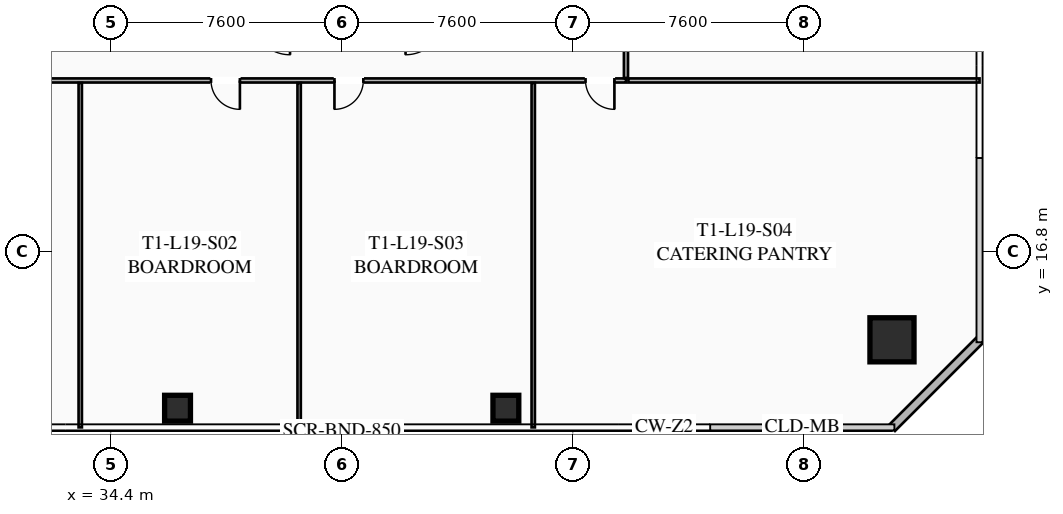
"""IFC4 building model, lengths in metres.
Left out: names, types, materials, properties, quantities, classifications, styles, units other than length and angle.
Written with IfcOpenShell. Run it as: python <this file> out.ifc"""

import sys

from ifc_helpers import new_model, si_unit, direction, frame, frame_2d, origin, origin_2d, place, context, subcontext, project, spatial, rectangle, hollow_rectangle, extrude, element, fill, save


model = new_model("IFC4")
c1 = context("Model", 3, precision=1e-05, world=origin(), true_north=direction((0.0, 1.0)))
c2 = subcontext(c1, "Body", "Model", "MODEL_VIEW")
j1 = project(units=[si_unit("LENGTHUNIT", "METRE"), si_unit("PLANEANGLEUNIT", "RADIAN")], contexts=[c1])
p1 = place(None, origin())
s1 = spatial("IfcSite", under=j1, at=p1, CompositionType="ELEMENT")
p2 = place(p1, origin())
s2 = spatial("IfcBuilding", under=s1, at=p2, CompositionType="ELEMENT")
p3 = place(p2, frame((0.0, 0.0, 74.3)))
s3 = spatial("IfcBuildingStorey", under=s2, at=p3, CompositionType="ELEMENT", Elevation=74.3)
p4 = place(p3, frame((60.1, 13.9, 0.0), z_axis=(0.0, 0.0, 1.0), x_axis=(1.0, 0.0, 0.0)))
e1 = element("IfcColumn", 1, at=p4, inside=s3, PredefinedType="COLUMN", context=c2, shape_type="SweptSolid", body=[
    extrude(hollow_rectangle(XDim=1.45, YDim=1.45, WallThickness=0.055, at=origin_2d()), origin(), (0.0, 0.0, 1.0), 3.35),
])
for number, where, z_axis, x_axis in (
    (2, (36.6, 11.65, 0.0), (0.0, 0.0, 1.0), (1.0, 0.0, 0.0)),
    (3, (47.4, 11.65, 0.0), (0.0, 0.0, 1.0), (1.0, 0.0, 0.0)),
):
    element("IfcColumn", number, at=place(p3, frame(where, z_axis=z_axis, x_axis=x_axis)), inside=s3, PredefinedType="COLUMN", context=c2, shape_type="SweptSolid", body=[
        extrude(hollow_rectangle(XDim=0.85, YDim=0.85, WallThickness=0.035, at=origin_2d()), origin(), (0.0, 0.0, 1.0), 3.35),
    ])
p5 = place(p3, frame((63.0, 13.9, 0.0), z_axis=(0.0, 0.0, 1.0), x_axis=(-0.707106781187, -0.707106781187, 0.0)))
e4 = element("IfcWall", 4, at=p5, inside=s3, PredefinedType="SOLIDWALL", context=c2, shape_type="SweptSolid", body=[
    extrude(rectangle(XDim=4.101, YDim=0.28, at=frame_2d((2.051, 0.0))), origin(), (0.0, 0.0, 1.0), 3.35),
])
p6 = place(p3, frame((51.35, 22.43, 0.0), z_axis=(0.0, 0.0, 1.0), x_axis=(-1.0, 0.0, 0.0)))
e5 = element("IfcWall", 5, at=p6, inside=s3, PredefinedType="PARTITIONING", context=c2, shape_type="SweptSolid", body=[
    extrude(rectangle(XDim=27.3, YDim=0.135, at=frame_2d((13.65, 0.0))), origin(), (0.0, 0.0, 1.0), 2.703),
])
p7 = place(p6, frame((25.97, 0.0, 0.0)))
e6 = element("IfcOpeningElement", 6, at=p7, cuts=e5, PredefinedType="OPENING", context=c2, shape_type="SweptSolid", body=[
    extrude(rectangle(XDim=0.95, YDim=2.05, at=frame_2d((0.475, 1.025))), frame((0.0, 0.077, 0.0), z_axis=(0.0, -1.0, 0.0), x_axis=(1.0, 0.0, 0.0)), (0.0, 0.0, 1.0), 0.155),
])
p8 = place(p6, frame((12.698, 0.0, 0.0)))
e7 = element("IfcOpeningElement", 7, at=p8, cuts=e5, PredefinedType="OPENING", context=c2, shape_type="SweptSolid", body=[
    extrude(rectangle(XDim=0.95, YDim=2.05, at=frame_2d((0.475, 1.025))), frame((0.0, 0.077, 0.0), z_axis=(0.0, -1.0, 0.0), x_axis=(1.0, 0.0, 0.0)), (0.0, 0.0, 1.0), 0.155),
])
p9 = place(p6, frame((8.639, 0.0, 0.0)))
e8 = element("IfcOpeningElement", 8, at=p9, cuts=e5, PredefinedType="OPENING", context=c2, shape_type="SweptSolid", body=[
    extrude(rectangle(XDim=0.95, YDim=2.05, at=frame_2d((0.475, 1.025))), frame((0.0, 0.077, 0.0), z_axis=(0.0, -1.0, 0.0), x_axis=(1.0, 0.0, 0.0)), (0.0, 0.0, 1.0), 0.155),
])
p10 = place(p6, frame((0.38, 0.0, 0.0)))
e9 = element("IfcOpeningElement", 9, at=p10, cuts=e5, PredefinedType="OPENING", context=c2, shape_type="SweptSolid", body=[
    extrude(rectangle(XDim=0.95, YDim=2.05, at=frame_2d((0.475, 1.025))), frame((0.0, 0.077, 0.0), z_axis=(0.0, -1.0, 0.0), x_axis=(1.0, 0.0, 0.0)), (0.0, 0.0, 1.0), 0.155),
])
for number, where, z_axis, x_axis in (
    (10, (33.4, 11.02, 0.0), (0.0, 0.0, 1.0), (0.0, 1.0, 0.0)),
    (11, (40.6, 11.02, 0.0), (0.0, 0.0, 1.0), (0.0, 1.0, 0.0)),
    (12, (48.3, 11.02, 0.0), (0.0, 0.0, 1.0), (0.0, 1.0, 0.0)),
):
    element("IfcWall", number, at=place(p3, frame(where, z_axis=z_axis, x_axis=x_axis)), inside=s3, PredefinedType="PARTITIONING", context=c2, shape_type="SweptSolid", body=[
        extrude(rectangle(XDim=11.33, YDim=0.11, at=frame_2d((5.665, 0.0))), origin(), (0.0, 0.0, 1.0), 2.703),
    ])
p11 = place(p3, frame((51.35, 42.77, 0.0), z_axis=(0.0, 0.0, 1.0), x_axis=(0.0, -1.0, 0.0)))
e13 = element("IfcWall", 13, at=p11, inside=s3, PredefinedType="PARTITIONING", context=c2, shape_type="SweptSolid", body=[
    extrude(rectangle(XDim=20.26, YDim=0.135, at=frame_2d((10.13, 0.0))), origin(), (0.0, 0.0, 1.0), 2.703),
])
p12 = place(p11, frame((10.181, 0.0, 0.0)))
e14 = element("IfcOpeningElement", 14, at=p12, cuts=e13, PredefinedType="OPENING", context=c2, shape_type="SweptSolid", body=[
    extrude(rectangle(XDim=0.95, YDim=2.05, at=frame_2d((0.475, 1.025))), frame((0.0, 0.077, 0.0), z_axis=(0.0, -1.0, 0.0), x_axis=(1.0, 0.0, 0.0)), (0.0, 0.0, 1.0), 0.155),
])
p13 = place(p11, frame((0.3, 0.0, 0.0)))
e15 = element("IfcOpeningElement", 15, at=p13, cuts=e13, PredefinedType="OPENING", context=c2, shape_type="SweptSolid", body=[
    extrude(rectangle(XDim=0.95, YDim=2.05, at=frame_2d((0.475, 1.025))), frame((0.0, 0.077, 0.0), z_axis=(0.0, -1.0, 0.0), x_axis=(1.0, 0.0, 0.0)), (0.0, 0.0, 1.0), 0.155),
])
p14 = place(p3, frame((51.43, 22.43, 0.0), z_axis=(0.0, 0.0, 1.0), x_axis=(1.0, 0.0, 0.0)))
e16 = element("IfcWall", 16, at=p14, inside=s3, PredefinedType="PARTITIONING", context=c2, shape_type="SweptSolid", body=[
    extrude(rectangle(XDim=11.55, YDim=0.135, at=frame_2d((5.775, 0.0))), origin(), (0.0, 0.0, 1.0), 2.703),
])
p15 = place(p8, origin())
e17 = element("IfcDoor", 17, at=p15, inside=s3, OperationType="SINGLE_SWING_LEFT", PredefinedType="DOOR", context=c2, shape_type="SweptSolid", body=[
    extrude(rectangle(XDim=0.95, YDim=2.05, at=frame_2d((0.475, 1.025))), frame((0.0, 0.025, 0.0), z_axis=(0.0, -1.0, 0.0), x_axis=(1.0, 0.0, 0.0)), (0.0, 0.0, 1.0), 0.05),
])
fill(e7, e17)
p16 = place(p9, origin())
e18 = element("IfcDoor", 18, at=p16, inside=s3, OperationType="SINGLE_SWING_RIGHT", PredefinedType="DOOR", context=c2, shape_type="SweptSolid", body=[
    extrude(rectangle(XDim=0.95, YDim=2.05, at=frame_2d((0.475, 1.025))), frame((0.0, 0.025, 0.0), z_axis=(0.0, -1.0, 0.0), x_axis=(1.0, 0.0, 0.0)), (0.0, 0.0, 1.0), 0.05),
])
fill(e8, e18)
p17 = place(p10, origin())
e19 = element("IfcDoor", 19, at=p17, inside=s3, OperationType="SINGLE_SWING_LEFT", PredefinedType="DOOR", context=c2, shape_type="SweptSolid", body=[
    extrude(rectangle(XDim=0.95, YDim=2.05, at=frame_2d((0.475, 1.025))), frame((0.0, 0.025, 0.0), z_axis=(0.0, -1.0, 0.0), x_axis=(1.0, 0.0, 0.0)), (0.0, 0.0, 1.0), 0.05),
])
fill(e9, e19)
save(model, sys.argv[1])
